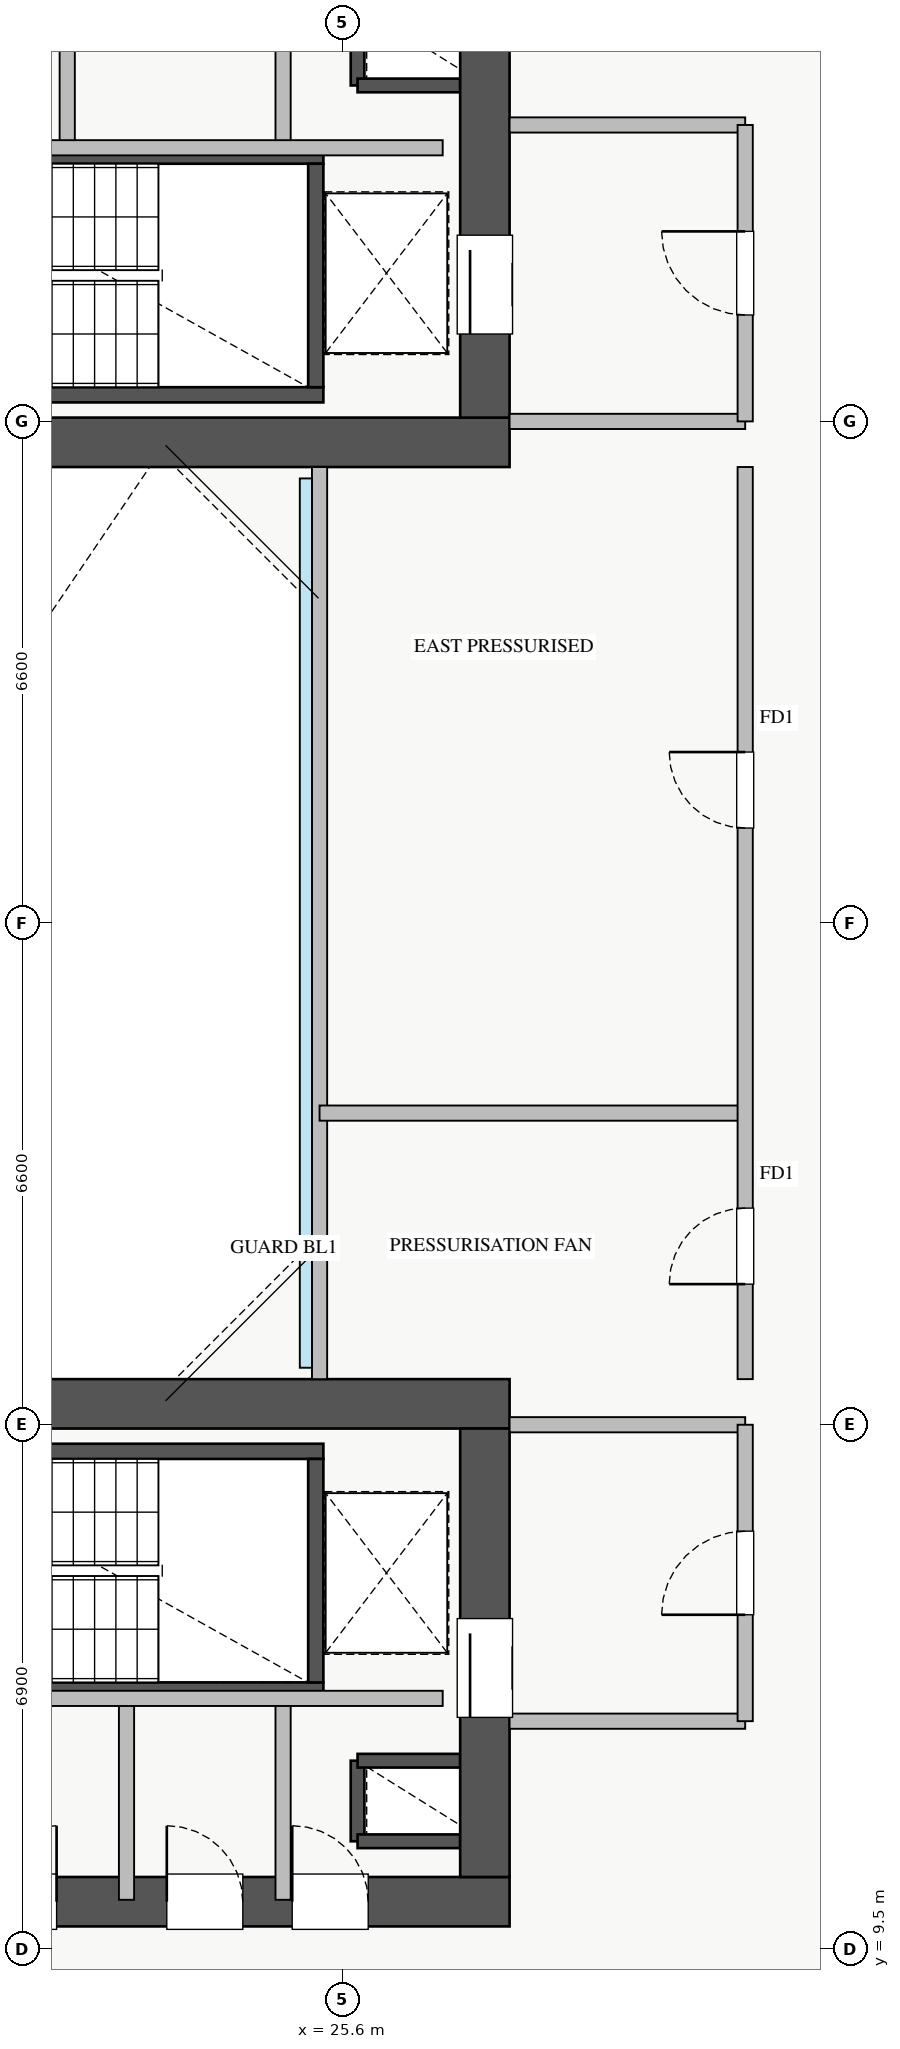
"""IFC4 building model, lengths in metres.
Left out: names, types, materials, properties, quantities, classifications, styles, units other than length and angle.
Written with IfcOpenShell. Run it as: python <this file> out.ifc"""

import sys

from ifc_helpers import new_model, si_unit, direction, frame, frame_2d, origin, place, context, subcontext, project, spatial, rectangle, extrude, source, transform, mapped, element, fill, save


model = new_model("IFC4")
c1 = context("Model", 3, precision=1e-05, world=origin(), true_north=direction((0.0, 1.0)))
c2 = subcontext(c1, "Body", "Model", "MODEL_VIEW")
j1 = project(units=[si_unit("LENGTHUNIT", "METRE"), si_unit("PLANEANGLEUNIT", "RADIAN")], contexts=[c1])
p1 = place(None, origin())
s1 = spatial("IfcSite", under=j1, at=p1, CompositionType="ELEMENT")
p2 = place(p1, origin())
s2 = spatial("IfcBuilding", under=s1, at=p2, CompositionType="ELEMENT")
p3 = place(p2, frame((0.0, 0.0, 139.25)))
s3 = spatial("IfcBuildingStorey", under=s2, at=p3, CompositionType="ELEMENT", Elevation=139.25)
p4 = place(p3, frame((25.8, 34.02, 0.0), z_axis=(0.0, 0.0, 1.0), x_axis=(0.0, 1.0, 0.0)))
e1 = element("IfcWall", 1, at=p4, inside=s3, PredefinedType="SHEAR", context=c2, shape_type="SweptSolid", body=[
    extrude(rectangle(XDim=1.06, YDim=0.18, at=frame_2d((0.53, 0.0))), origin(), (0.0, 0.0, 1.0), 4.32),
])
p5 = place(p3, frame((25.8, 34.02, 0.0), z_axis=(0.0, 0.0, 1.0), x_axis=(1.0, 0.0, 0.0)))
e2 = element("IfcWall", 2, at=p5, inside=s3, PredefinedType="SHEAR", context=c2, shape_type="SweptSolid", body=[
    extrude(rectangle(XDim=1.35, YDim=0.18, at=frame_2d((0.675, 0.0))), origin(), (0.0, 0.0, 1.0), 4.32),
])
p6 = place(p3, frame((25.8, 10.92, 0.0), z_axis=(0.0, 0.0, 1.0), x_axis=(0.0, 1.0, 0.0)))
e3 = element("IfcWall", 3, at=p6, inside=s3, PredefinedType="SHEAR", context=c2, shape_type="SweptSolid", body=[
    extrude(rectangle(XDim=1.06, YDim=0.18, at=frame_2d((0.53, 0.0))), origin(), (0.0, 0.0, 1.0), 4.32),
])
for number, where, z_axis, x_axis in (
    (4, (25.8, 11.98, 0.0), (0.0, 0.0, 1.0), (1.0, 0.0, 0.0)),
    (5, (25.8, 10.92, 0.0), (0.0, 0.0, 1.0), (1.0, 0.0, 0.0)),
):
    element("IfcWall", number, at=place(p3, frame(where, z_axis=z_axis, x_axis=x_axis)), inside=s3, PredefinedType="SHEAR", context=c2, shape_type="SweptSolid", body=[
        extrude(rectangle(XDim=1.35, YDim=0.18, at=frame_2d((0.675, 0.0))), origin(), (0.0, 0.0, 1.0), 4.32),
    ])
p7 = place(p3, frame((18.2, 29.95, 0.0), z_axis=(0.0, 0.0, 1.0), x_axis=(1.0, 0.0, 0.0)))
e6 = element("IfcWall", 6, at=p7, inside=s3, PredefinedType="SHEAR", context=c2, shape_type="SweptSolid", body=[
    extrude(rectangle(XDim=7.15, YDim=0.2, at=frame_2d((3.575, 0.0))), origin(), (0.0, 0.0, 1.0), 4.5),
])
p8 = place(p3, frame((18.2, 33.09, 0.0), z_axis=(0.0, 0.0, 1.0), x_axis=(1.0, 0.0, 0.0)))
e7 = element("IfcWall", 7, at=p8, inside=s3, PredefinedType="SHEAR", context=c2, shape_type="SweptSolid", body=[
    extrude(rectangle(XDim=7.15, YDim=0.2, at=frame_2d((3.575, 0.0))), origin(), (0.0, 0.0, 1.0), 4.5),
])
p9 = place(p8, frame((0.35, 0.0, 0.0)))
e8 = element("IfcOpeningElement", 8, at=p9, cuts=e7, PredefinedType="OPENING", context=c2, shape_type="SweptSolid", body=[
    extrude(rectangle(XDim=1.1, YDim=2.05, at=frame_2d((0.55, 1.025))), frame((0.0, 0.11, 0.0), z_axis=(0.0, -1.0, 0.0), x_axis=(1.0, 0.0, 0.0)), (0.0, 0.0, 1.0), 0.22),
])
p10 = place(p3, frame((25.25, 30.05, 0.0), z_axis=(0.0, 0.0, 1.0), x_axis=(0.0, 1.0, 0.0)))
e9 = element("IfcWall", 9, at=p10, inside=s3, PredefinedType="SHEAR", context=c2, shape_type="SweptSolid", body=[
    extrude(rectangle(XDim=2.94, YDim=0.2, at=frame_2d((1.47, 0.0))), origin(), (0.0, 0.0, 1.0), 4.5),
])
p11 = place(p3, frame((18.2, 12.91, 0.0), z_axis=(0.0, 0.0, 1.0), x_axis=(1.0, 0.0, 0.0)))
e10 = element("IfcWall", 10, at=p11, inside=s3, PredefinedType="SHEAR", context=c2, shape_type="SweptSolid", body=[
    extrude(rectangle(XDim=7.15, YDim=0.2, at=frame_2d((3.575, 0.0))), origin(), (0.0, 0.0, 1.0), 4.5),
])
p12 = place(p11, frame((0.35, 0.0, 0.0)))
e11 = element("IfcOpeningElement", 11, at=p12, cuts=e10, PredefinedType="OPENING", context=c2, shape_type="SweptSolid", body=[
    extrude(rectangle(XDim=1.1, YDim=2.05, at=frame_2d((0.55, 1.025))), frame((0.0, 0.11, 0.0), z_axis=(0.0, -1.0, 0.0), x_axis=(1.0, 0.0, 0.0)), (0.0, 0.0, 1.0), 0.22),
])
p13 = place(p3, frame((18.2, 16.05, 0.0), z_axis=(0.0, 0.0, 1.0), x_axis=(1.0, 0.0, 0.0)))
e12 = element("IfcWall", 12, at=p13, inside=s3, PredefinedType="SHEAR", context=c2, shape_type="SweptSolid", body=[
    extrude(rectangle(XDim=7.15, YDim=0.2, at=frame_2d((3.575, 0.0))), origin(), (0.0, 0.0, 1.0), 4.5),
])
p14 = place(p3, frame((25.25, 13.01, 0.0), z_axis=(0.0, 0.0, 1.0), x_axis=(0.0, 1.0, 0.0)))
e13 = element("IfcWall", 13, at=p14, inside=s3, PredefinedType="SHEAR", context=c2, shape_type="SweptSolid", body=[
    extrude(rectangle(XDim=2.94, YDim=0.2, at=frame_2d((1.47, 0.0))), origin(), (0.0, 0.0, 1.0), 4.5),
])
p15 = place(p3, frame((10.2, 29.325, 0.0), z_axis=(0.0, 0.0, 1.0), x_axis=(1.0, 0.0, 0.0)))
e14 = element("IfcWall", 14, at=p15, inside=s3, PredefinedType="SHEAR", context=c2, shape_type="SweptSolid", body=[
    extrude(rectangle(XDim=17.6, YDim=0.65, at=frame_2d((8.8, 0.0))), origin(), (0.0, 0.0, 1.0), 4.5),
])
p16 = place(p3, frame((27.475, 29.65, 0.0), z_axis=(0.0, 0.0, 1.0), x_axis=(0.0, 1.0, 0.0)))
e15 = element("IfcWall", 15, at=p16, inside=s3, PredefinedType="SHEAR", context=c2, shape_type="SweptSolid", body=[
    extrude(rectangle(XDim=5.9, YDim=0.65, at=frame_2d((2.95, 0.0))), origin(), (0.0, 0.0, 1.0), 4.5),
])
p17 = place(p16, frame((1.1, 0.0, 0.0)))
e16 = element("IfcOpeningElement", 16, at=p17, cuts=e15, PredefinedType="OPENING", context=c2, shape_type="SweptSolid", body=[
    extrude(rectangle(XDim=1.3, YDim=2.05, at=frame_2d((0.65, 1.025))), frame((0.0, 0.335, 0.0), z_axis=(0.0, -1.0, 0.0), x_axis=(1.0, 0.0, 0.0)), (0.0, 0.0, 1.0), 0.67),
])
p18 = place(p3, frame((10.2, 10.125, 0.0), z_axis=(0.0, 0.0, 1.0), x_axis=(1.0, 0.0, 0.0)))
e17 = element("IfcWall", 17, at=p18, inside=s3, PredefinedType="SHEAR", context=c2, shape_type="SweptSolid", body=[
    extrude(rectangle(XDim=17.6, YDim=0.65, at=frame_2d((8.8, 0.0))), origin(), (0.0, 0.0, 1.0), 4.5),
])
p19 = place(p18, frame((1.15, 0.0, 0.0)))
e18 = element("IfcOpeningElement", 18, at=p19, cuts=e17, PredefinedType="OPENING", context=c2, shape_type="SweptSolid", body=[
    extrude(rectangle(XDim=1.1, YDim=2.05, at=frame_2d((0.55, 1.025))), frame((0.0, 0.335, 0.0), z_axis=(0.0, -1.0, 0.0), x_axis=(1.0, 0.0, 0.0)), (0.0, 0.0, 1.0), 0.67),
])
p20 = place(p18, frame((8.3, 0.0, 0.0)))
e19 = element("IfcOpeningElement", 19, at=p20, cuts=e17, PredefinedType="OPENING", context=c2, shape_type="SweptSolid", body=[
    extrude(rectangle(XDim=1.1, YDim=2.05, at=frame_2d((0.55, 1.025))), frame((0.0, 0.335, 0.0), z_axis=(0.0, -1.0, 0.0), x_axis=(1.0, 0.0, 0.0)), (0.0, 0.0, 1.0), 0.67),
])
p21 = place(p18, frame((4.9, 0.0, 0.0)))
e20 = element("IfcOpeningElement", 20, at=p21, cuts=e17, PredefinedType="OPENING", context=c2, shape_type="SweptSolid", body=[
    extrude(rectangle(XDim=1.1, YDim=2.05, at=frame_2d((0.55, 1.025))), frame((0.0, 0.335, 0.0), z_axis=(0.0, -1.0, 0.0), x_axis=(1.0, 0.0, 0.0)), (0.0, 0.0, 1.0), 0.67),
])
p22 = place(p18, frame((2.85, 0.0, 0.0)))
e21 = element("IfcOpeningElement", 21, at=p22, cuts=e17, PredefinedType="OPENING", context=c2, shape_type="SweptSolid", body=[
    extrude(rectangle(XDim=1.1, YDim=2.05, at=frame_2d((0.55, 1.025))), frame((0.0, 0.335, 0.0), z_axis=(0.0, -1.0, 0.0), x_axis=(1.0, 0.0, 0.0)), (0.0, 0.0, 1.0), 0.67),
])
p23 = place(p18, frame((14.74, 0.0, 0.0)))
e22 = element("IfcOpeningElement", 22, at=p23, cuts=e17, PredefinedType="OPENING", context=c2, shape_type="SweptSolid", body=[
    extrude(rectangle(XDim=1.0, YDim=2.05, at=frame_2d((0.5, 1.025))), frame((0.0, 0.335, 0.0), z_axis=(0.0, -1.0, 0.0), x_axis=(1.0, 0.0, 0.0)), (0.0, 0.0, 1.0), 0.67),
])
p24 = place(p18, frame((10.64, 0.0, 0.0)))
e23 = element("IfcOpeningElement", 23, at=p24, cuts=e17, PredefinedType="OPENING", context=c2, shape_type="SweptSolid", body=[
    extrude(rectangle(XDim=1.0, YDim=2.05, at=frame_2d((0.5, 1.025))), frame((0.0, 0.335, 0.0), z_axis=(0.0, -1.0, 0.0), x_axis=(1.0, 0.0, 0.0)), (0.0, 0.0, 1.0), 0.67),
])
p25 = place(p18, frame((13.09, 0.0, 0.0)))
e24 = element("IfcOpeningElement", 24, at=p25, cuts=e17, PredefinedType="OPENING", context=c2, shape_type="SweptSolid", body=[
    extrude(rectangle(XDim=1.0, YDim=2.05, at=frame_2d((0.5, 1.025))), frame((0.0, 0.335, 0.0), z_axis=(0.0, -1.0, 0.0), x_axis=(1.0, 0.0, 0.0)), (0.0, 0.0, 1.0), 0.67),
])
p26 = place(p3, frame((10.2, 16.675, 0.0), z_axis=(0.0, 0.0, 1.0), x_axis=(1.0, 0.0, 0.0)))
e25 = element("IfcWall", 25, at=p26, inside=s3, PredefinedType="SHEAR", context=c2, shape_type="SweptSolid", body=[
    extrude(rectangle(XDim=17.6, YDim=0.65, at=frame_2d((8.8, 0.0))), origin(), (0.0, 0.0, 1.0), 4.5),
])
p27 = place(p3, frame((27.475, 10.45, 0.0), z_axis=(0.0, 0.0, 1.0), x_axis=(0.0, 1.0, 0.0)))
e26 = element("IfcWall", 26, at=p27, inside=s3, PredefinedType="SHEAR", context=c2, shape_type="SweptSolid", body=[
    extrude(rectangle(XDim=5.9, YDim=0.65, at=frame_2d((2.95, 0.0))), origin(), (0.0, 0.0, 1.0), 4.5),
])
p28 = place(p27, frame((2.1, 0.0, 0.0)))
e27 = element("IfcOpeningElement", 27, at=p28, cuts=e26, PredefinedType="OPENING", context=c2, shape_type="SweptSolid", body=[
    extrude(rectangle(XDim=1.3, YDim=2.05, at=frame_2d((0.65, 1.025))), frame((0.0, 0.335, 0.0), z_axis=(0.0, -1.0, 0.0), x_axis=(1.0, 0.0, 0.0)), (0.0, 0.0, 1.0), 0.67),
])
p29 = place(p3, frame((27.8, 29.6, 0.0), z_axis=(0.0, 0.0, 1.0), x_axis=(1.0, 0.0, 0.0)))
e28 = element("IfcWall", 28, at=p29, inside=s3, PredefinedType="PARTITIONING", context=c2, shape_type="SweptSolid", body=[
    extrude(rectangle(XDim=3.1, YDim=0.2, at=frame_2d((1.55, 0.0))), origin(), (0.0, 0.0, 1.0), 4.32),
])
p30 = place(p3, frame((27.8, 33.5, 0.0), z_axis=(0.0, 0.0, 1.0), x_axis=(1.0, 0.0, 0.0)))
e29 = element("IfcWall", 29, at=p30, inside=s3, PredefinedType="PARTITIONING", context=c2, shape_type="SweptSolid", body=[
    extrude(rectangle(XDim=3.1, YDim=0.2, at=frame_2d((1.55, 0.0))), origin(), (0.0, 0.0, 1.0), 3.465),
])
p31 = place(p3, frame((30.9, 29.6, 0.0), z_axis=(0.0, 0.0, 1.0), x_axis=(0.0, 1.0, 0.0)))
e30 = element("IfcWall", 30, at=p31, inside=s3, PredefinedType="PARTITIONING", context=c2, shape_type="SweptSolid", body=[
    extrude(rectangle(XDim=3.9, YDim=0.2, at=frame_2d((1.95, 0.0))), origin(), (0.0, 0.0, 1.0), 4.32),
])
p32 = place(p31, frame((1.4, 0.0, 0.0)))
e31 = element("IfcOpeningElement", 31, at=p32, cuts=e30, PredefinedType="OPENING", context=c2, shape_type="SweptSolid", body=[
    extrude(rectangle(XDim=1.1, YDim=2.05, at=frame_2d((0.55, 1.025))), frame((0.0, 0.11, 0.0), z_axis=(0.0, -1.0, 0.0), x_axis=(1.0, 0.0, 0.0)), (0.0, 0.0, 1.0), 0.22),
])
for number, where, z_axis, x_axis in (
    (32, (27.8, 16.4, 0.0), (0.0, 0.0, 1.0), (1.0, 0.0, 0.0)),
    (33, (27.8, 12.5, 0.0), (0.0, 0.0, 1.0), (1.0, 0.0, 0.0)),
):
    element("IfcWall", number, at=place(p3, frame(where, z_axis=z_axis, x_axis=x_axis)), inside=s3, PredefinedType="PARTITIONING", context=c2, shape_type="SweptSolid", body=[
        extrude(rectangle(XDim=3.1, YDim=0.2, at=frame_2d((1.55, 0.0))), origin(), (0.0, 0.0, 1.0), 4.32),
    ])
p33 = place(p3, frame((30.9, 12.5, 0.0), z_axis=(0.0, 0.0, 1.0), x_axis=(0.0, 1.0, 0.0)))
e34 = element("IfcWall", 34, at=p33, inside=s3, PredefinedType="PARTITIONING", context=c2, shape_type="SweptSolid", body=[
    extrude(rectangle(XDim=3.9, YDim=0.2, at=frame_2d((1.95, 0.0))), origin(), (0.0, 0.0, 1.0), 4.32),
])
p34 = place(p33, frame((1.4, 0.0, 0.0)))
e35 = element("IfcOpeningElement", 35, at=p34, cuts=e34, PredefinedType="OPENING", context=c2, shape_type="SweptSolid", body=[
    extrude(rectangle(XDim=1.1, YDim=2.05, at=frame_2d((0.55, 1.025))), frame((0.0, 0.11, 0.0), z_axis=(0.0, -1.0, 0.0), x_axis=(1.0, 0.0, 0.0)), (0.0, 0.0, 1.0), 0.22),
])
for number, where, z_axis, x_axis in (
    (36, (24.82, 33.2, 0.0), (0.0, 0.0, 1.0), (0.0, 1.0, 0.0)),
    (37, (24.82, 10.15, 0.0), (0.0, 0.0, 1.0), (0.0, 1.0, 0.0)),
    (38, (21.98, 33.2, 0.0), (0.0, 0.0, 1.0), (0.0, 1.0, 0.0)),
):
    element("IfcWall", number, at=place(p3, frame(where, z_axis=z_axis, x_axis=x_axis)), inside=s3, PredefinedType="PARTITIONING", context=c2, shape_type="SweptSolid", body=[
        extrude(rectangle(XDim=2.65, YDim=0.2, at=frame_2d((1.325, 0.0))), origin(), (0.0, 0.0, 1.0), 4.32),
    ])
p35 = place(p3, frame((21.75, 33.2, 0.0), z_axis=(0.0, 0.0, 1.0), x_axis=(1.0, 0.0, 0.0)))
e39 = element("IfcWall", 39, at=p35, inside=s3, PredefinedType="PARTITIONING", context=c2, shape_type="SweptSolid", body=[
    extrude(rectangle(XDim=5.17, YDim=0.2, at=frame_2d((2.585, 0.0))), origin(), (0.0, 0.0, 1.0), 4.32),
])
p36 = place(p3, frame((22.76, 10.15, 0.0), z_axis=(0.0, 0.0, 1.0), x_axis=(0.0, 1.0, 0.0)))
e40 = element("IfcWall", 40, at=p36, inside=s3, PredefinedType="PARTITIONING", context=c2, shape_type="SweptSolid", body=[
    extrude(rectangle(XDim=2.65, YDim=0.2, at=frame_2d((1.325, 0.0))), origin(), (0.0, 0.0, 1.0), 4.32),
])
p37 = place(p3, frame((21.75, 12.8, 0.0), z_axis=(0.0, 0.0, 1.0), x_axis=(1.0, 0.0, 0.0)))
e41 = element("IfcWall", 41, at=p37, inside=s3, PredefinedType="PARTITIONING", context=c2, shape_type="SweptSolid", body=[
    extrude(rectangle(XDim=5.17, YDim=0.2, at=frame_2d((2.585, 0.0))), origin(), (0.0, 0.0, 1.0), 4.32),
])
p38 = place(p3, frame((25.3, 17.0, 0.0), z_axis=(0.0, 0.0, 1.0), x_axis=(0.0, 1.0, 0.0)))
e42 = element("IfcWall", 42, at=p38, inside=s3, PredefinedType="PARTITIONING", context=c2, shape_type="SweptSolid", body=[
    extrude(rectangle(XDim=12.0, YDim=0.2, at=frame_2d((6.0, 0.0))), origin(), (0.0, 0.0, 1.0), 3.815),
])
p39 = place(p3, frame((25.3, 20.5, 0.0), z_axis=(0.0, 0.0, 1.0), x_axis=(1.0, 0.0, 0.0)))
e43 = element("IfcWall", 43, at=p39, inside=s3, PredefinedType="PARTITIONING", context=c2, shape_type="SweptSolid", body=[
    extrude(rectangle(XDim=5.6, YDim=0.2, at=frame_2d((2.8, 0.0))), origin(), (0.0, 0.0, 1.0), 4.32),
])
p40 = place(p3, frame((30.9, 17.0, 0.0), z_axis=(0.0, 0.0, 1.0), x_axis=(0.0, 1.0, 0.0)))
e44 = element("IfcWall", 44, at=p40, inside=s3, PredefinedType="PARTITIONING", context=c2, shape_type="SweptSolid", body=[
    extrude(rectangle(XDim=12.0, YDim=0.2, at=frame_2d((6.0, 0.0))), origin(), (0.0, 0.0, 1.0), 4.32),
])
p41 = place(p40, frame((1.25, 0.0, 0.0)))
e45 = element("IfcOpeningElement", 45, at=p41, cuts=e44, PredefinedType="OPENING", context=c2, shape_type="SweptSolid", body=[
    extrude(rectangle(XDim=1.0, YDim=2.05, at=frame_2d((0.5, 1.025))), frame((0.0, 0.11, 0.0), z_axis=(0.0, -1.0, 0.0), x_axis=(1.0, 0.0, 0.0)), (0.0, 0.0, 1.0), 0.22),
])
p42 = place(p40, frame((7.25, 0.0, 0.0)))
e46 = element("IfcOpeningElement", 46, at=p42, cuts=e44, PredefinedType="OPENING", context=c2, shape_type="SweptSolid", body=[
    extrude(rectangle(XDim=1.0, YDim=2.05, at=frame_2d((0.5, 1.025))), frame((0.0, 0.11, 0.0), z_axis=(0.0, -1.0, 0.0), x_axis=(1.0, 0.0, 0.0)), (0.0, 0.0, 1.0), 0.22),
])
m1 = source(origin(), c2, "Body", "SweptSolid", [
    extrude(rectangle(XDim=1.3, YDim=2.05, at=frame_2d((0.65, 1.025))), frame((0.0, 0.025, 0.0), z_axis=(0.0, -1.0, 0.0), x_axis=(1.0, 0.0, 0.0)), (0.0, 0.0, 1.0), 0.05),
])
p43 = place(p17, origin())
e47 = element("IfcDoor", 47, at=p43, inside=s3, OperationType="SLIDING_TO_LEFT", PredefinedType="DOOR", context=c2, shape_type="MappedRepresentation", body=[
    mapped(m1, transform((0.0, 0.0, 0.0), x_axis=(1.0, 0.0, 0.0), y_axis=(0.0, 1.0, 0.0), z_axis=(0.0, 0.0, 1.0), scale=1.0)),
])
fill(e16, e47)
p44 = place(p28, origin())
e48 = element("IfcDoor", 48, at=p44, inside=s3, OperationType="SLIDING_TO_RIGHT", PredefinedType="DOOR", context=c2, shape_type="MappedRepresentation", body=[
    mapped(m1, transform((0.0, 0.0, 0.0), x_axis=(1.0, 0.0, 0.0), y_axis=(0.0, 1.0, 0.0), z_axis=(0.0, 0.0, 1.0), scale=1.0)),
])
fill(e27, e48)
m2 = source(origin(), c2, "Body", "SweptSolid", [
    extrude(rectangle(XDim=1.0, YDim=2.05, at=frame_2d((0.5, 1.025))), frame((0.0, 0.025, 0.0), z_axis=(0.0, -1.0, 0.0), x_axis=(1.0, 0.0, 0.0)), (0.0, 0.0, 1.0), 0.05),
])
p45 = place(p23, origin())
e49 = element("IfcDoor", 49, at=p45, inside=s3, OperationType="SINGLE_SWING_LEFT", PredefinedType="DOOR", context=c2, shape_type="MappedRepresentation", body=[
    mapped(m2, transform((0.0, 0.0, 0.0), x_axis=(1.0, 0.0, 0.0), y_axis=(0.0, 1.0, 0.0), z_axis=(0.0, 0.0, 1.0), scale=1.0)),
])
fill(e22, e49)
p46 = place(p24, origin())
e50 = element("IfcDoor", 50, at=p46, inside=s3, OperationType="SINGLE_SWING_RIGHT", PredefinedType="DOOR", context=c2, shape_type="MappedRepresentation", body=[
    mapped(m2, transform((0.0, 0.0, 0.0), x_axis=(1.0, 0.0, 0.0), y_axis=(0.0, 1.0, 0.0), z_axis=(0.0, 0.0, 1.0), scale=1.0)),
])
fill(e23, e50)
p47 = place(p25, origin())
e51 = element("IfcDoor", 51, at=p47, inside=s3, OperationType="SINGLE_SWING_LEFT", PredefinedType="DOOR", context=c2, shape_type="MappedRepresentation", body=[
    mapped(m2, transform((0.0, 0.0, 0.0), x_axis=(1.0, 0.0, 0.0), y_axis=(0.0, 1.0, 0.0), z_axis=(0.0, 0.0, 1.0), scale=1.0)),
])
fill(e24, e51)
m3 = source(origin(), c2, "Body", "SweptSolid", [
    extrude(rectangle(XDim=1.1, YDim=2.05, at=frame_2d((0.55, 1.025))), frame((0.0, 0.025, 0.0), z_axis=(0.0, -1.0, 0.0), x_axis=(1.0, 0.0, 0.0)), (0.0, 0.0, 1.0), 0.05),
])
p48 = place(p32, origin())
e52 = element("IfcDoor", 52, at=p48, inside=s3, OperationType="SINGLE_SWING_RIGHT", PredefinedType="DOOR", context=c2, shape_type="MappedRepresentation", body=[
    mapped(m3, transform((0.0, 0.0, 0.0), x_axis=(1.0, 0.0, 0.0), y_axis=(0.0, 1.0, 0.0), z_axis=(0.0, 0.0, 1.0), scale=1.0)),
])
fill(e31, e52)
p49 = place(p34, origin())
e53 = element("IfcDoor", 53, at=p49, inside=s3, OperationType="SINGLE_SWING_LEFT", PredefinedType="DOOR", context=c2, shape_type="MappedRepresentation", body=[
    mapped(m3, transform((0.0, 0.0, 0.0), x_axis=(1.0, 0.0, 0.0), y_axis=(0.0, 1.0, 0.0), z_axis=(0.0, 0.0, 1.0), scale=1.0)),
])
fill(e35, e53)
p50 = place(p41, origin())
e54 = element("IfcDoor", 54, at=p50, inside=s3, OperationType="SINGLE_SWING_LEFT", PredefinedType="DOOR", context=c2, shape_type="MappedRepresentation", body=[
    mapped(m2, transform((0.0, 0.0, 0.0), x_axis=(1.0, 0.0, 0.0), y_axis=(0.0, 1.0, 0.0), z_axis=(0.0, 0.0, 1.0), scale=1.0)),
])
fill(e45, e54)
p51 = place(p42, origin())
e55 = element("IfcDoor", 55, at=p51, inside=s3, OperationType="SINGLE_SWING_RIGHT", PredefinedType="DOOR", context=c2, shape_type="MappedRepresentation", body=[
    mapped(m2, transform((0.0, 0.0, 0.0), x_axis=(1.0, 0.0, 0.0), y_axis=(0.0, 1.0, 0.0), z_axis=(0.0, 0.0, 1.0), scale=1.0)),
])
fill(e46, e55)
save(model, sys.argv[1])
